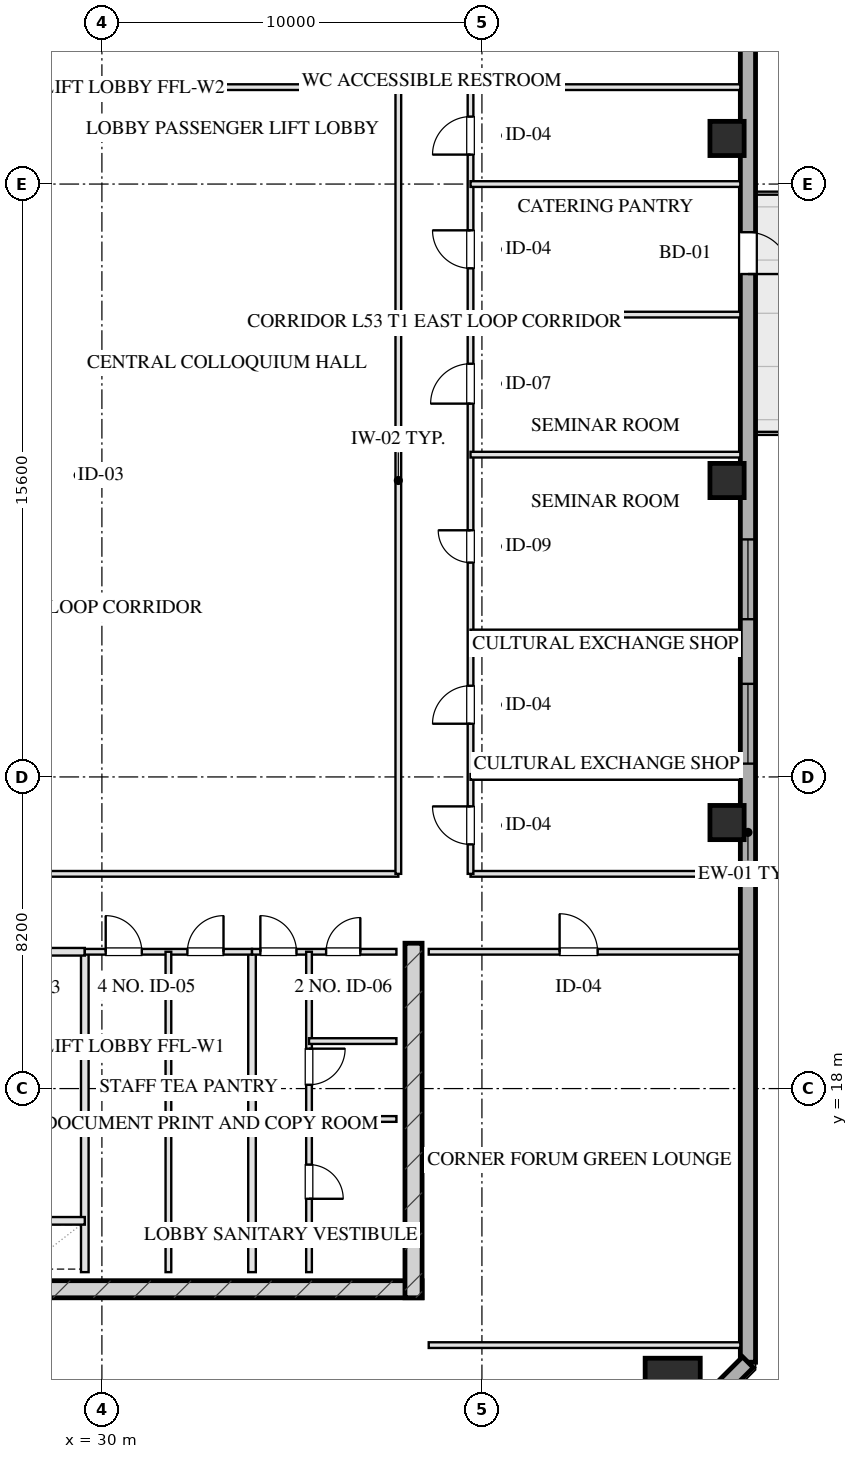
"""IFC4 building model, lengths in metres.
Left out: names, types, materials, properties, quantities, classifications, styles, units other than length and angle.
Written with IfcOpenShell. Run it as: python <this file> out.ifc"""

import sys

from ifc_helpers import new_model, si_unit, direction, frame, frame_2d, origin, origin_2d, place, context, subcontext, project, spatial, rectangle, hollow_rectangle, extrude, element, fill, save


model = new_model("IFC4")
c1 = context("Model", 3, precision=1e-05, world=origin(), true_north=direction((0.0, 1.0)))
c2 = subcontext(c1, "Body", "Model", "MODEL_VIEW")
j1 = project(units=[si_unit("LENGTHUNIT", "METRE"), si_unit("PLANEANGLEUNIT", "RADIAN")], contexts=[c1])
p1 = place(None, origin())
s1 = spatial("IfcSite", under=j1, at=p1, CompositionType="ELEMENT")
p2 = place(p1, origin())
s2 = spatial("IfcBuilding", under=s1, at=p2, CompositionType="ELEMENT")
p3 = place(p2, frame((0.0, 0.0, 198.95)))
s3 = spatial("IfcBuildingStorey", under=s2, at=p3, CompositionType="ELEMENT", Elevation=198.95)
p4 = place(p3, frame((21.575, 12.72, 0.0), z_axis=(0.0, 0.0, 1.0), x_axis=(1.0, 0.0, 0.0)))
e1 = element("IfcWall", 1, at=p4, inside=s3, PredefinedType="SHEAR", context=c2, shape_type="SweptSolid", body=[
    extrude(rectangle(XDim=16.85, YDim=0.45, at=frame_2d((8.425, 0.0))), origin(), (0.0, 0.0, 1.0), 3.45),
])
p5 = place(p3, frame((38.2, 21.825, 0.0), z_axis=(0.0, 0.0, 1.0), x_axis=(0.0, -1.0, 0.0)))
e2 = element("IfcWall", 2, at=p5, inside=s3, PredefinedType="SHEAR", context=c2, shape_type="SweptSolid", body=[
    extrude(rectangle(XDim=9.33, YDim=0.45, at=frame_2d((4.665, 0.0))), origin(), (0.0, 0.0, 1.0), 3.45),
])
p6 = place(p3, frame((45.02, 10.18, 0.0), z_axis=(0.0, 0.0, 1.0), x_axis=(1.0, 0.0, 0.0)))
e3 = element("IfcColumn", 3, at=p6, inside=s3, PredefinedType="COLUMN", context=c2, shape_type="SweptSolid", body=[
    extrude(hollow_rectangle(XDim=1.45, YDim=1.45, WallThickness=0.05, at=origin_2d()), origin(), (0.0, 0.0, 1.0), 3.451),
])
for number, where, z_axis, x_axis in (
    (4, (46.45, 25.0, 0.0), (0.0, 0.0, 1.0), (1.0, 0.0, 0.0)),
    (5, (46.45, 34.0, 0.0), (0.0, 0.0, 1.0), (1.0, 0.0, 0.0)),
    (6, (46.45, 43.0, 0.0), (0.0, 0.0, 1.0), (1.0, 0.0, 0.0)),
):
    element("IfcColumn", number, at=place(p3, frame(where, z_axis=z_axis, x_axis=x_axis)), inside=s3, PredefinedType="COLUMN", context=c2, shape_type="SweptSolid", body=[
        extrude(hollow_rectangle(XDim=0.9, YDim=0.9, WallThickness=0.032, at=origin_2d()), origin(), (0.0, 0.0, 1.0), 3.451),
    ])
p7 = place(p3, frame((47.0, 57.2, 0.0), z_axis=(0.0, 0.0, 1.0), x_axis=(0.0, -1.0, 0.0)))
e7 = element("IfcWall", 7, at=p7, inside=s3, PredefinedType="SOLIDWALL", context=c2, shape_type="SweptSolid", body=[
    extrude(rectangle(XDim=46.4, YDim=0.4, at=frame_2d((23.2, 0.0))), origin(), (0.0, 0.0, 1.0), 2.61),
])
p8 = place(p7, frame((28.55, 0.0, 0.75)))
e8 = element("IfcOpeningElement", 8, at=p8, cuts=e7, PredefinedType="OPENING", context=c2, shape_type="SweptSolid", body=[
    extrude(rectangle(XDim=2.1, YDim=1.46, at=frame_2d((1.05, 0.73))), frame((0.0, 0.21, 0.0), z_axis=(0.0, -1.0, 0.0), x_axis=(1.0, 0.0, 0.0)), (0.0, 0.0, 1.0), 0.42),
])
p9 = place(p7, frame((24.75, 0.0, 0.75)))
e9 = element("IfcOpeningElement", 9, at=p9, cuts=e7, PredefinedType="OPENING", context=c2, shape_type="SweptSolid", body=[
    extrude(rectangle(XDim=2.1, YDim=1.46, at=frame_2d((1.05, 0.73))), frame((0.0, 0.21, 0.0), z_axis=(0.0, -1.0, 0.0), x_axis=(1.0, 0.0, 0.0)), (0.0, 0.0, 1.0), 0.42),
])
p10 = place(p7, frame((16.667, 0.0, 0.0)))
e10 = element("IfcOpeningElement", 10, at=p10, cuts=e7, PredefinedType="OPENING", context=c2, shape_type="SweptSolid", body=[
    extrude(rectangle(XDim=1.1, YDim=2.15, at=frame_2d((0.55, 1.075))), frame((0.0, 0.21, 0.0), z_axis=(0.0, -1.0, 0.0), x_axis=(1.0, 0.0, 0.0)), (0.0, 0.0, 1.0), 0.42),
])
p11 = place(p3, frame((47.0, 10.8, 0.0), z_axis=(0.0, 0.0, 1.0), x_axis=(-0.707106781187, -0.707106781187, 0.0)))
e11 = element("IfcWall", 11, at=p11, inside=s3, PredefinedType="SOLIDWALL", context=c2, shape_type="SweptSolid", body=[
    extrude(rectangle(XDim=3.677, YDim=0.4, at=frame_2d((1.838, 0.0))), origin(), (0.0, 0.0, 1.0), 2.61),
])
p12 = place(p3, frame((29.55, 21.6, 0.0), z_axis=(0.0, 0.0, 1.0), x_axis=(0.0, -1.0, 0.0)))
e12 = element("IfcWall", 12, at=p12, inside=s3, PredefinedType="PARTITIONING", context=c2, shape_type="SweptSolid", body=[
    extrude(rectangle(XDim=8.43, YDim=0.2, at=frame_2d((4.215, 0.0))), origin(), (0.0, 0.0, 1.0), 3.175),
])
p13 = place(p3, frame((25.72, 21.6, 0.0), z_axis=(0.0, 0.0, 1.0), x_axis=(1.0, 0.0, 0.0)))
e13 = element("IfcWall", 13, at=p13, inside=s3, PredefinedType="PARTITIONING", context=c2, shape_type="SweptSolid", body=[
    extrude(rectangle(XDim=3.83, YDim=0.2, at=frame_2d((1.915, 0.0))), origin(), (0.0, 0.0, 1.0), 3.175),
])
p14 = place(p13, frame((1.35, 0.0, 0.0)))
e14 = element("IfcOpeningElement", 14, at=p14, cuts=e13, PredefinedType="OPENING", context=c2, shape_type="SweptSolid", body=[
    extrude(rectangle(XDim=1.2, YDim=2.05, at=frame_2d((0.6, 1.025))), frame((0.0, 0.11, 0.0), z_axis=(0.0, -1.0, 0.0), x_axis=(1.0, 0.0, 0.0)), (0.0, 0.0, 1.0), 0.22),
])
p15 = place(p3, frame((27.82, 14.52, 0.0), z_axis=(0.0, 0.0, 1.0), x_axis=(1.0, 0.0, 0.0)))
e15 = element("IfcWall", 15, at=p15, inside=s3, PredefinedType="PARTITIONING", context=c2, shape_type="SweptSolid", body=[
    extrude(rectangle(XDim=1.73, YDim=0.2, at=frame_2d((0.865, 0.0))), origin(), (0.0, 0.0, 1.0), 3.175),
])
p16 = place(p3, frame((33.95, 21.6, 0.0), z_axis=(0.0, 0.0, 1.0), x_axis=(0.0, -1.0, 0.0)))
e16 = element("IfcWall", 16, at=p16, inside=s3, PredefinedType="PARTITIONING", context=c2, shape_type="SweptSolid", body=[
    extrude(rectangle(XDim=8.43, YDim=0.2, at=frame_2d((4.215, 0.0))), origin(), (0.0, 0.0, 1.0), 3.175),
])
p17 = place(p3, frame((29.55, 21.6, 0.0), z_axis=(0.0, 0.0, 1.0), x_axis=(1.0, 0.0, 0.0)))
e17 = element("IfcWall", 17, at=p17, inside=s3, PredefinedType="PARTITIONING", context=c2, shape_type="SweptSolid", body=[
    extrude(rectangle(XDim=4.4, YDim=0.15, at=frame_2d((2.2, 0.0))), origin(), (0.0, 0.0, 1.0), 3.175),
])
p18 = place(p17, frame((0.55, 0.0, 0.0)))
e18 = element("IfcOpeningElement", 18, at=p18, cuts=e17, PredefinedType="OPENING", context=c2, shape_type="SweptSolid", body=[
    extrude(rectangle(XDim=0.95, YDim=2.05, at=frame_2d((0.475, 1.025))), frame((0.0, 0.085, 0.0), z_axis=(0.0, -1.0, 0.0), x_axis=(1.0, 0.0, 0.0)), (0.0, 0.0, 1.0), 0.17),
])
p19 = place(p17, frame((2.7, 0.0, 0.0)))
e19 = element("IfcOpeningElement", 19, at=p19, cuts=e17, PredefinedType="OPENING", context=c2, shape_type="SweptSolid", body=[
    extrude(rectangle(XDim=0.95, YDim=2.05, at=frame_2d((0.475, 1.025))), frame((0.0, 0.085, 0.0), z_axis=(0.0, -1.0, 0.0), x_axis=(1.0, 0.0, 0.0)), (0.0, 0.0, 1.0), 0.17),
])
p20 = place(p3, frame((31.75, 21.6, 0.0), z_axis=(0.0, 0.0, 1.0), x_axis=(0.0, -1.0, 0.0)))
e20 = element("IfcWall", 20, at=p20, inside=s3, PredefinedType="PARTITIONING", context=c2, shape_type="SweptSolid", body=[
    extrude(rectangle(XDim=8.43, YDim=0.15, at=frame_2d((4.215, 0.0))), origin(), (0.0, 0.0, 1.0), 3.175),
])
p21 = place(p3, frame((33.95, 21.6, 0.0), z_axis=(0.0, 0.0, 1.0), x_axis=(1.0, 0.0, 0.0)))
e21 = element("IfcWall", 21, at=p21, inside=s3, PredefinedType="PARTITIONING", context=c2, shape_type="SweptSolid", body=[
    extrude(rectangle(XDim=3.8, YDim=0.15, at=frame_2d((1.9, 0.0))), origin(), (0.0, 0.0, 1.0), 3.175),
])
p22 = place(p21, frame((0.22, 0.0, 0.0)))
e22 = element("IfcOpeningElement", 22, at=p22, cuts=e21, PredefinedType="OPENING", context=c2, shape_type="SweptSolid", body=[
    extrude(rectangle(XDim=0.95, YDim=2.05, at=frame_2d((0.475, 1.025))), frame((0.0, 0.085, 0.0), z_axis=(0.0, -1.0, 0.0), x_axis=(1.0, 0.0, 0.0)), (0.0, 0.0, 1.0), 0.17),
])
p23 = place(p21, frame((1.95, 0.0, 0.0)))
e23 = element("IfcOpeningElement", 23, at=p23, cuts=e21, PredefinedType="OPENING", context=c2, shape_type="SweptSolid", body=[
    extrude(rectangle(XDim=0.9, YDim=2.05, at=frame_2d((0.45, 1.025))), frame((0.0, 0.085, 0.0), z_axis=(0.0, -1.0, 0.0), x_axis=(1.0, 0.0, 0.0)), (0.0, 0.0, 1.0), 0.17),
])
p24 = place(p3, frame((35.45, 21.6, 0.0), z_axis=(0.0, 0.0, 1.0), x_axis=(0.0, -1.0, 0.0)))
e24 = element("IfcWall", 24, at=p24, inside=s3, PredefinedType="PARTITIONING", context=c2, shape_type="SweptSolid", body=[
    extrude(rectangle(XDim=8.43, YDim=0.15, at=frame_2d((4.215, 0.0))), origin(), (0.0, 0.0, 1.0), 2.815),
])
p25 = place(p24, frame((2.55, 0.0, 0.0)))
e25 = element("IfcOpeningElement", 25, at=p25, cuts=e24, PredefinedType="OPENING", context=c2, shape_type="SweptSolid", body=[
    extrude(rectangle(XDim=0.95, YDim=2.05, at=frame_2d((0.475, 1.025))), frame((0.0, 0.085, 0.0), z_axis=(0.0, -1.0, 0.0), x_axis=(1.0, 0.0, 0.0)), (0.0, 0.0, 1.0), 0.17),
])
p26 = place(p24, frame((5.6, 0.0, 0.0)))
e26 = element("IfcOpeningElement", 26, at=p26, cuts=e24, PredefinedType="OPENING", context=c2, shape_type="SweptSolid", body=[
    extrude(rectangle(XDim=0.9, YDim=2.05, at=frame_2d((0.45, 1.025))), frame((0.0, 0.085, 0.0), z_axis=(0.0, -1.0, 0.0), x_axis=(1.0, 0.0, 0.0)), (0.0, 0.0, 1.0), 0.17),
])
for number, where, z_axis, x_axis in (
    (27, (35.45, 17.2, 0.0), (0.0, 0.0, 1.0), (1.0, 0.0, 0.0)),
    (28, (35.45, 19.25, 0.0), (0.0, 0.0, 1.0), (1.0, 0.0, 0.0)),
):
    element("IfcWall", number, at=place(p3, frame(where, z_axis=z_axis, x_axis=x_axis)), inside=s3, PredefinedType="PARTITIONING", context=c2, shape_type="SweptSolid", body=[
        extrude(rectangle(XDim=2.3, YDim=0.15, at=frame_2d((1.15, 0.0))), origin(), (0.0, 0.0, 1.0), 3.175),
    ])
p27 = place(p3, frame((38.6, 11.25, 0.0), z_axis=(0.0, 0.0, 1.0), x_axis=(1.0, 0.0, 0.0)))
e29 = element("IfcWall", 29, at=p27, inside=s3, PredefinedType="PARTITIONING", context=c2, shape_type="SweptSolid", body=[
    extrude(rectangle(XDim=8.2, YDim=0.15, at=frame_2d((4.1, 0.0))), origin(), (0.0, 0.0, 1.0), 3.175),
])
p28 = place(p3, frame((38.6, 21.6, 0.0), z_axis=(0.0, 0.0, 1.0), x_axis=(1.0, 0.0, 0.0)))
e30 = element("IfcWall", 30, at=p28, inside=s3, PredefinedType="PARTITIONING", context=c2, shape_type="SweptSolid", body=[
    extrude(rectangle(XDim=8.2, YDim=0.15, at=frame_2d((4.1, 0.0))), origin(), (0.0, 0.0, 1.0), 3.175),
])
p29 = place(p28, frame((3.444, 0.0, 0.0)))
e31 = element("IfcOpeningElement", 31, at=p29, cuts=e30, PredefinedType="OPENING", context=c2, shape_type="SweptSolid", body=[
    extrude(rectangle(XDim=1.0, YDim=2.05, at=frame_2d((0.5, 1.025))), frame((0.0, 0.085, 0.0), z_axis=(0.0, -1.0, 0.0), x_axis=(1.0, 0.0, 0.0)), (0.0, 0.0, 1.0), 0.17),
])
p30 = place(p3, frame((28.45, 23.65, 0.0), z_axis=(0.0, 0.0, 1.0), x_axis=(1.0, 0.0, 0.0)))
e32 = element("IfcWall", 32, at=p30, inside=s3, PredefinedType="PARTITIONING", context=c2, shape_type="SweptSolid", body=[
    extrude(rectangle(XDim=9.35, YDim=0.15, at=frame_2d((4.675, 0.0))), origin(), (0.0, 0.0, 1.0), 3.175),
])
p31 = place(p3, frame((39.7, 23.65, 0.0), z_axis=(0.0, 0.0, 1.0), x_axis=(1.0, 0.0, 0.0)))
e33 = element("IfcWall", 33, at=p31, inside=s3, PredefinedType="PARTITIONING", context=c2, shape_type="SweptSolid", body=[
    extrude(rectangle(XDim=7.1, YDim=0.15, at=frame_2d((3.55, 0.0))), origin(), (0.0, 0.0, 1.0), 3.175),
])
p32 = place(p3, frame((28.45, 44.35, 0.0), z_axis=(0.0, 0.0, 1.0), x_axis=(1.0, 0.0, 0.0)))
e34 = element("IfcWall", 34, at=p32, inside=s3, PredefinedType="PARTITIONING", context=c2, shape_type="SweptSolid", body=[
    extrude(rectangle(XDim=9.35, YDim=0.15, at=frame_2d((4.675, 0.0))), origin(), (0.0, 0.0, 1.0), 3.175),
])
p33 = place(p3, frame((39.7, 44.35, 0.0), z_axis=(0.0, 0.0, 1.0), x_axis=(1.0, 0.0, 0.0)))
e35 = element("IfcWall", 35, at=p33, inside=s3, PredefinedType="PARTITIONING", context=c2, shape_type="SweptSolid", body=[
    extrude(rectangle(XDim=7.1, YDim=0.15, at=frame_2d((3.55, 0.0))), origin(), (0.0, 0.0, 1.0), 3.175),
])
p34 = place(p3, frame((37.8, 23.65, 0.0), z_axis=(0.0, 0.0, 1.0), x_axis=(0.0, 1.0, 0.0)))
e36 = element("IfcWall", 36, at=p34, inside=s3, PredefinedType="PARTITIONING", context=c2, shape_type="SweptSolid", body=[
    extrude(rectangle(XDim=20.7, YDim=0.15, at=frame_2d((10.35, 0.0))), origin(), (0.0, 0.0, 1.0), 3.175),
])
p35 = place(p3, frame((39.7, 23.65, 0.0), z_axis=(0.0, 0.0, 1.0), x_axis=(0.0, 1.0, 0.0)))
e37 = element("IfcWall", 37, at=p35, inside=s3, PredefinedType="PARTITIONING", context=c2, shape_type="SweptSolid", body=[
    extrude(rectangle(XDim=20.7, YDim=0.15, at=frame_2d((10.35, 0.0))), origin(), (0.0, 0.0, 1.0), 3.175),
])
p36 = place(p35, frame((0.775, 0.0, 0.0)))
e38 = element("IfcOpeningElement", 38, at=p36, cuts=e37, PredefinedType="OPENING", context=c2, shape_type="SweptSolid", body=[
    extrude(rectangle(XDim=1.0, YDim=2.05, at=frame_2d((0.5, 1.025))), frame((0.0, 0.085, 0.0), z_axis=(0.0, -1.0, 0.0), x_axis=(1.0, 0.0, 0.0)), (0.0, 0.0, 1.0), 0.17),
])
p37 = place(p35, frame((3.95, 0.0, 0.0)))
e39 = element("IfcOpeningElement", 39, at=p37, cuts=e37, PredefinedType="OPENING", context=c2, shape_type="SweptSolid", body=[
    extrude(rectangle(XDim=1.0, YDim=2.05, at=frame_2d((0.5, 1.025))), frame((0.0, 0.085, 0.0), z_axis=(0.0, -1.0, 0.0), x_axis=(1.0, 0.0, 0.0)), (0.0, 0.0, 1.0), 0.17),
])
p38 = place(p35, frame((8.19, 0.0, 0.0)))
e40 = element("IfcOpeningElement", 40, at=p38, cuts=e37, PredefinedType="OPENING", context=c2, shape_type="SweptSolid", body=[
    extrude(rectangle(XDim=0.85, YDim=2.05, at=frame_2d((0.425, 1.025))), frame((0.0, 0.085, 0.0), z_axis=(0.0, -1.0, 0.0), x_axis=(1.0, 0.0, 0.0)), (0.0, 0.0, 1.0), 0.17),
])
p39 = place(p35, frame((12.373, 0.0, 0.0)))
e41 = element("IfcOpeningElement", 41, at=p39, cuts=e37, PredefinedType="OPENING", context=c2, shape_type="SweptSolid", body=[
    extrude(rectangle(XDim=1.05, YDim=2.05, at=frame_2d((0.525, 1.025))), frame((0.0, 0.085, 0.0), z_axis=(0.0, -1.0, 0.0), x_axis=(1.0, 0.0, 0.0)), (0.0, 0.0, 1.0), 0.17),
])
p40 = place(p35, frame((15.933, 0.0, 0.0)))
e42 = element("IfcOpeningElement", 42, at=p40, cuts=e37, PredefinedType="OPENING", context=c2, shape_type="SweptSolid", body=[
    extrude(rectangle(XDim=1.0, YDim=2.05, at=frame_2d((0.5, 1.025))), frame((0.0, 0.085, 0.0), z_axis=(0.0, -1.0, 0.0), x_axis=(1.0, 0.0, 0.0)), (0.0, 0.0, 1.0), 0.17),
])
p41 = place(p35, frame((18.925, 0.0, 0.0)))
e43 = element("IfcOpeningElement", 43, at=p41, cuts=e37, PredefinedType="OPENING", context=c2, shape_type="SweptSolid", body=[
    extrude(rectangle(XDim=1.0, YDim=2.05, at=frame_2d((0.5, 1.025))), frame((0.0, 0.085, 0.0), z_axis=(0.0, -1.0, 0.0), x_axis=(1.0, 0.0, 0.0)), (0.0, 0.0, 1.0), 0.17),
])
for number, where, z_axis, x_axis in (
    (44, (39.7, 26.2, 0.0), (0.0, 0.0, 1.0), (1.0, 0.0, 0.0)),
    (45, (39.7, 30.0, 0.0), (0.0, 0.0, 1.0), (1.0, 0.0, 0.0)),
    (46, (39.7, 34.68, 0.0), (0.0, 0.0, 1.0), (1.0, 0.0, 0.0)),
    (47, (39.7, 38.365, 0.0), (0.0, 0.0, 1.0), (1.0, 0.0, 0.0)),
    (48, (39.7, 41.8, 0.0), (0.0, 0.0, 1.0), (1.0, 0.0, 0.0)),
):
    element("IfcWall", number, at=place(p3, frame(where, z_axis=z_axis, x_axis=x_axis)), inside=s3, PredefinedType="PARTITIONING", context=c2, shape_type="SweptSolid", body=[
        extrude(rectangle(XDim=7.1, YDim=0.15, at=frame_2d((3.55, 0.0))), origin(), (0.0, 0.0, 1.0), 3.175),
    ])
p42 = place(p8, origin())
e49 = element("IfcWindow", 49, at=p42, inside=s3, PartitioningType="TRIPLE_PANEL_VERTICAL", PredefinedType="WINDOW", context=c2, shape_type="SweptSolid", body=[
    extrude(rectangle(XDim=2.1, YDim=1.46, at=frame_2d((1.05, 0.73))), frame((0.0, 0.03, 0.0), z_axis=(0.0, -1.0, 0.0), x_axis=(1.0, 0.0, 0.0)), (0.0, 0.0, 1.0), 0.06),
])
fill(e8, e49)
p43 = place(p9, origin())
e50 = element("IfcWindow", 50, at=p43, inside=s3, PartitioningType="TRIPLE_PANEL_VERTICAL", PredefinedType="WINDOW", context=c2, shape_type="SweptSolid", body=[
    extrude(rectangle(XDim=2.1, YDim=1.46, at=frame_2d((1.05, 0.73))), frame((0.0, 0.03, 0.0), z_axis=(0.0, -1.0, 0.0), x_axis=(1.0, 0.0, 0.0)), (0.0, 0.0, 1.0), 0.06),
])
fill(e9, e50)
p44 = place(p10, origin())
e51 = element("IfcDoor", 51, at=p44, inside=s3, OperationType="SINGLE_SWING_RIGHT", PredefinedType="DOOR", context=c2, shape_type="SweptSolid", body=[
    extrude(rectangle(XDim=1.1, YDim=2.15, at=frame_2d((0.55, 1.075))), frame((0.0, 0.025, 0.0), z_axis=(0.0, -1.0, 0.0), x_axis=(1.0, 0.0, 0.0)), (0.0, 0.0, 1.0), 0.05),
])
fill(e10, e51)
p45 = place(p18, origin())
e52 = element("IfcDoor", 52, at=p45, inside=s3, OperationType="SINGLE_SWING_LEFT", PredefinedType="DOOR", context=c2, shape_type="SweptSolid", body=[
    extrude(rectangle(XDim=0.95, YDim=2.05, at=frame_2d((0.475, 1.025))), frame((0.0, 0.025, 0.0), z_axis=(0.0, -1.0, 0.0), x_axis=(1.0, 0.0, 0.0)), (0.0, 0.0, 1.0), 0.05),
])
fill(e18, e52)
p46 = place(p19, origin())
e53 = element("IfcDoor", 53, at=p46, inside=s3, OperationType="SINGLE_SWING_RIGHT", PredefinedType="DOOR", context=c2, shape_type="SweptSolid", body=[
    extrude(rectangle(XDim=0.95, YDim=2.05, at=frame_2d((0.475, 1.025))), frame((0.0, 0.025, 0.0), z_axis=(0.0, -1.0, 0.0), x_axis=(1.0, 0.0, 0.0)), (0.0, 0.0, 1.0), 0.05),
])
fill(e19, e53)
p47 = place(p22, origin())
e54 = element("IfcDoor", 54, at=p47, inside=s3, OperationType="SINGLE_SWING_LEFT", PredefinedType="DOOR", context=c2, shape_type="SweptSolid", body=[
    extrude(rectangle(XDim=0.95, YDim=2.05, at=frame_2d((0.475, 1.025))), frame((0.0, 0.025, 0.0), z_axis=(0.0, -1.0, 0.0), x_axis=(1.0, 0.0, 0.0)), (0.0, 0.0, 1.0), 0.05),
])
fill(e22, e54)
p48 = place(p23, origin())
e55 = element("IfcDoor", 55, at=p48, inside=s3, OperationType="SINGLE_SWING_RIGHT", PredefinedType="DOOR", context=c2, shape_type="SweptSolid", body=[
    extrude(rectangle(XDim=0.9, YDim=2.05, at=frame_2d((0.45, 1.025))), frame((0.0, 0.025, 0.0), z_axis=(0.0, -1.0, 0.0), x_axis=(1.0, 0.0, 0.0)), (0.0, 0.0, 1.0), 0.05),
])
fill(e23, e55)
p49 = place(p25, origin())
e56 = element("IfcDoor", 56, at=p49, inside=s3, OperationType="SINGLE_SWING_LEFT", PredefinedType="DOOR", context=c2, shape_type="SweptSolid", body=[
    extrude(rectangle(XDim=0.95, YDim=2.05, at=frame_2d((0.475, 1.025))), frame((0.0, 0.025, 0.0), z_axis=(0.0, -1.0, 0.0), x_axis=(1.0, 0.0, 0.0)), (0.0, 0.0, 1.0), 0.05),
])
fill(e25, e56)
p50 = place(p26, origin())
e57 = element("IfcDoor", 57, at=p50, inside=s3, OperationType="SINGLE_SWING_RIGHT", PredefinedType="DOOR", context=c2, shape_type="SweptSolid", body=[
    extrude(rectangle(XDim=0.9, YDim=2.05, at=frame_2d((0.45, 1.025))), frame((0.0, 0.025, 0.0), z_axis=(0.0, -1.0, 0.0), x_axis=(1.0, 0.0, 0.0)), (0.0, 0.0, 1.0), 0.05),
])
fill(e26, e57)
p51 = place(p29, origin())
e58 = element("IfcDoor", 58, at=p51, inside=s3, OperationType="SINGLE_SWING_LEFT", PredefinedType="DOOR", context=c2, shape_type="SweptSolid", body=[
    extrude(rectangle(XDim=1.0, YDim=2.05, at=frame_2d((0.5, 1.025))), frame((0.0, 0.025, 0.0), z_axis=(0.0, -1.0, 0.0), x_axis=(1.0, 0.0, 0.0)), (0.0, 0.0, 1.0), 0.05),
])
fill(e31, e58)
p52 = place(p36, origin())
e59 = element("IfcDoor", 59, at=p52, inside=s3, OperationType="SINGLE_SWING_RIGHT", PredefinedType="DOOR", context=c2, shape_type="SweptSolid", body=[
    extrude(rectangle(XDim=1.0, YDim=2.05, at=frame_2d((0.5, 1.025))), frame((0.0, 0.025, 0.0), z_axis=(0.0, -1.0, 0.0), x_axis=(1.0, 0.0, 0.0)), (0.0, 0.0, 1.0), 0.05),
])
fill(e38, e59)
p53 = place(p37, origin())
e60 = element("IfcDoor", 60, at=p53, inside=s3, OperationType="SINGLE_SWING_LEFT", PredefinedType="DOOR", context=c2, shape_type="SweptSolid", body=[
    extrude(rectangle(XDim=1.0, YDim=2.05, at=frame_2d((0.5, 1.025))), frame((0.0, 0.025, 0.0), z_axis=(0.0, -1.0, 0.0), x_axis=(1.0, 0.0, 0.0)), (0.0, 0.0, 1.0), 0.05),
])
fill(e39, e60)
p54 = place(p38, origin())
e61 = element("IfcDoor", 61, at=p54, inside=s3, OperationType="SINGLE_SWING_RIGHT", PredefinedType="DOOR", context=c2, shape_type="SweptSolid", body=[
    extrude(rectangle(XDim=0.85, YDim=2.05, at=frame_2d((0.425, 1.025))), frame((0.0, 0.025, 0.0), z_axis=(0.0, -1.0, 0.0), x_axis=(1.0, 0.0, 0.0)), (0.0, 0.0, 1.0), 0.05),
])
fill(e40, e61)
p55 = place(p39, origin())
e62 = element("IfcDoor", 62, at=p55, inside=s3, OperationType="SINGLE_SWING_LEFT", PredefinedType="DOOR", context=c2, shape_type="SweptSolid", body=[
    extrude(rectangle(XDim=1.05, YDim=2.05, at=frame_2d((0.525, 1.025))), frame((0.0, 0.025, 0.0), z_axis=(0.0, -1.0, 0.0), x_axis=(1.0, 0.0, 0.0)), (0.0, 0.0, 1.0), 0.05),
])
fill(e41, e62)
p56 = place(p40, origin())
e63 = element("IfcDoor", 63, at=p56, inside=s3, OperationType="SINGLE_SWING_RIGHT", PredefinedType="DOOR", context=c2, shape_type="SweptSolid", body=[
    extrude(rectangle(XDim=1.0, YDim=2.05, at=frame_2d((0.5, 1.025))), frame((0.0, 0.025, 0.0), z_axis=(0.0, -1.0, 0.0), x_axis=(1.0, 0.0, 0.0)), (0.0, 0.0, 1.0), 0.05),
])
fill(e42, e63)
p57 = place(p41, origin())
e64 = element("IfcDoor", 64, at=p57, inside=s3, OperationType="SINGLE_SWING_LEFT", PredefinedType="DOOR", context=c2, shape_type="SweptSolid", body=[
    extrude(rectangle(XDim=1.0, YDim=2.05, at=frame_2d((0.5, 1.025))), frame((0.0, 0.025, 0.0), z_axis=(0.0, -1.0, 0.0), x_axis=(1.0, 0.0, 0.0)), (0.0, 0.0, 1.0), 0.05),
])
fill(e43, e64)
save(model, sys.argv[1])
